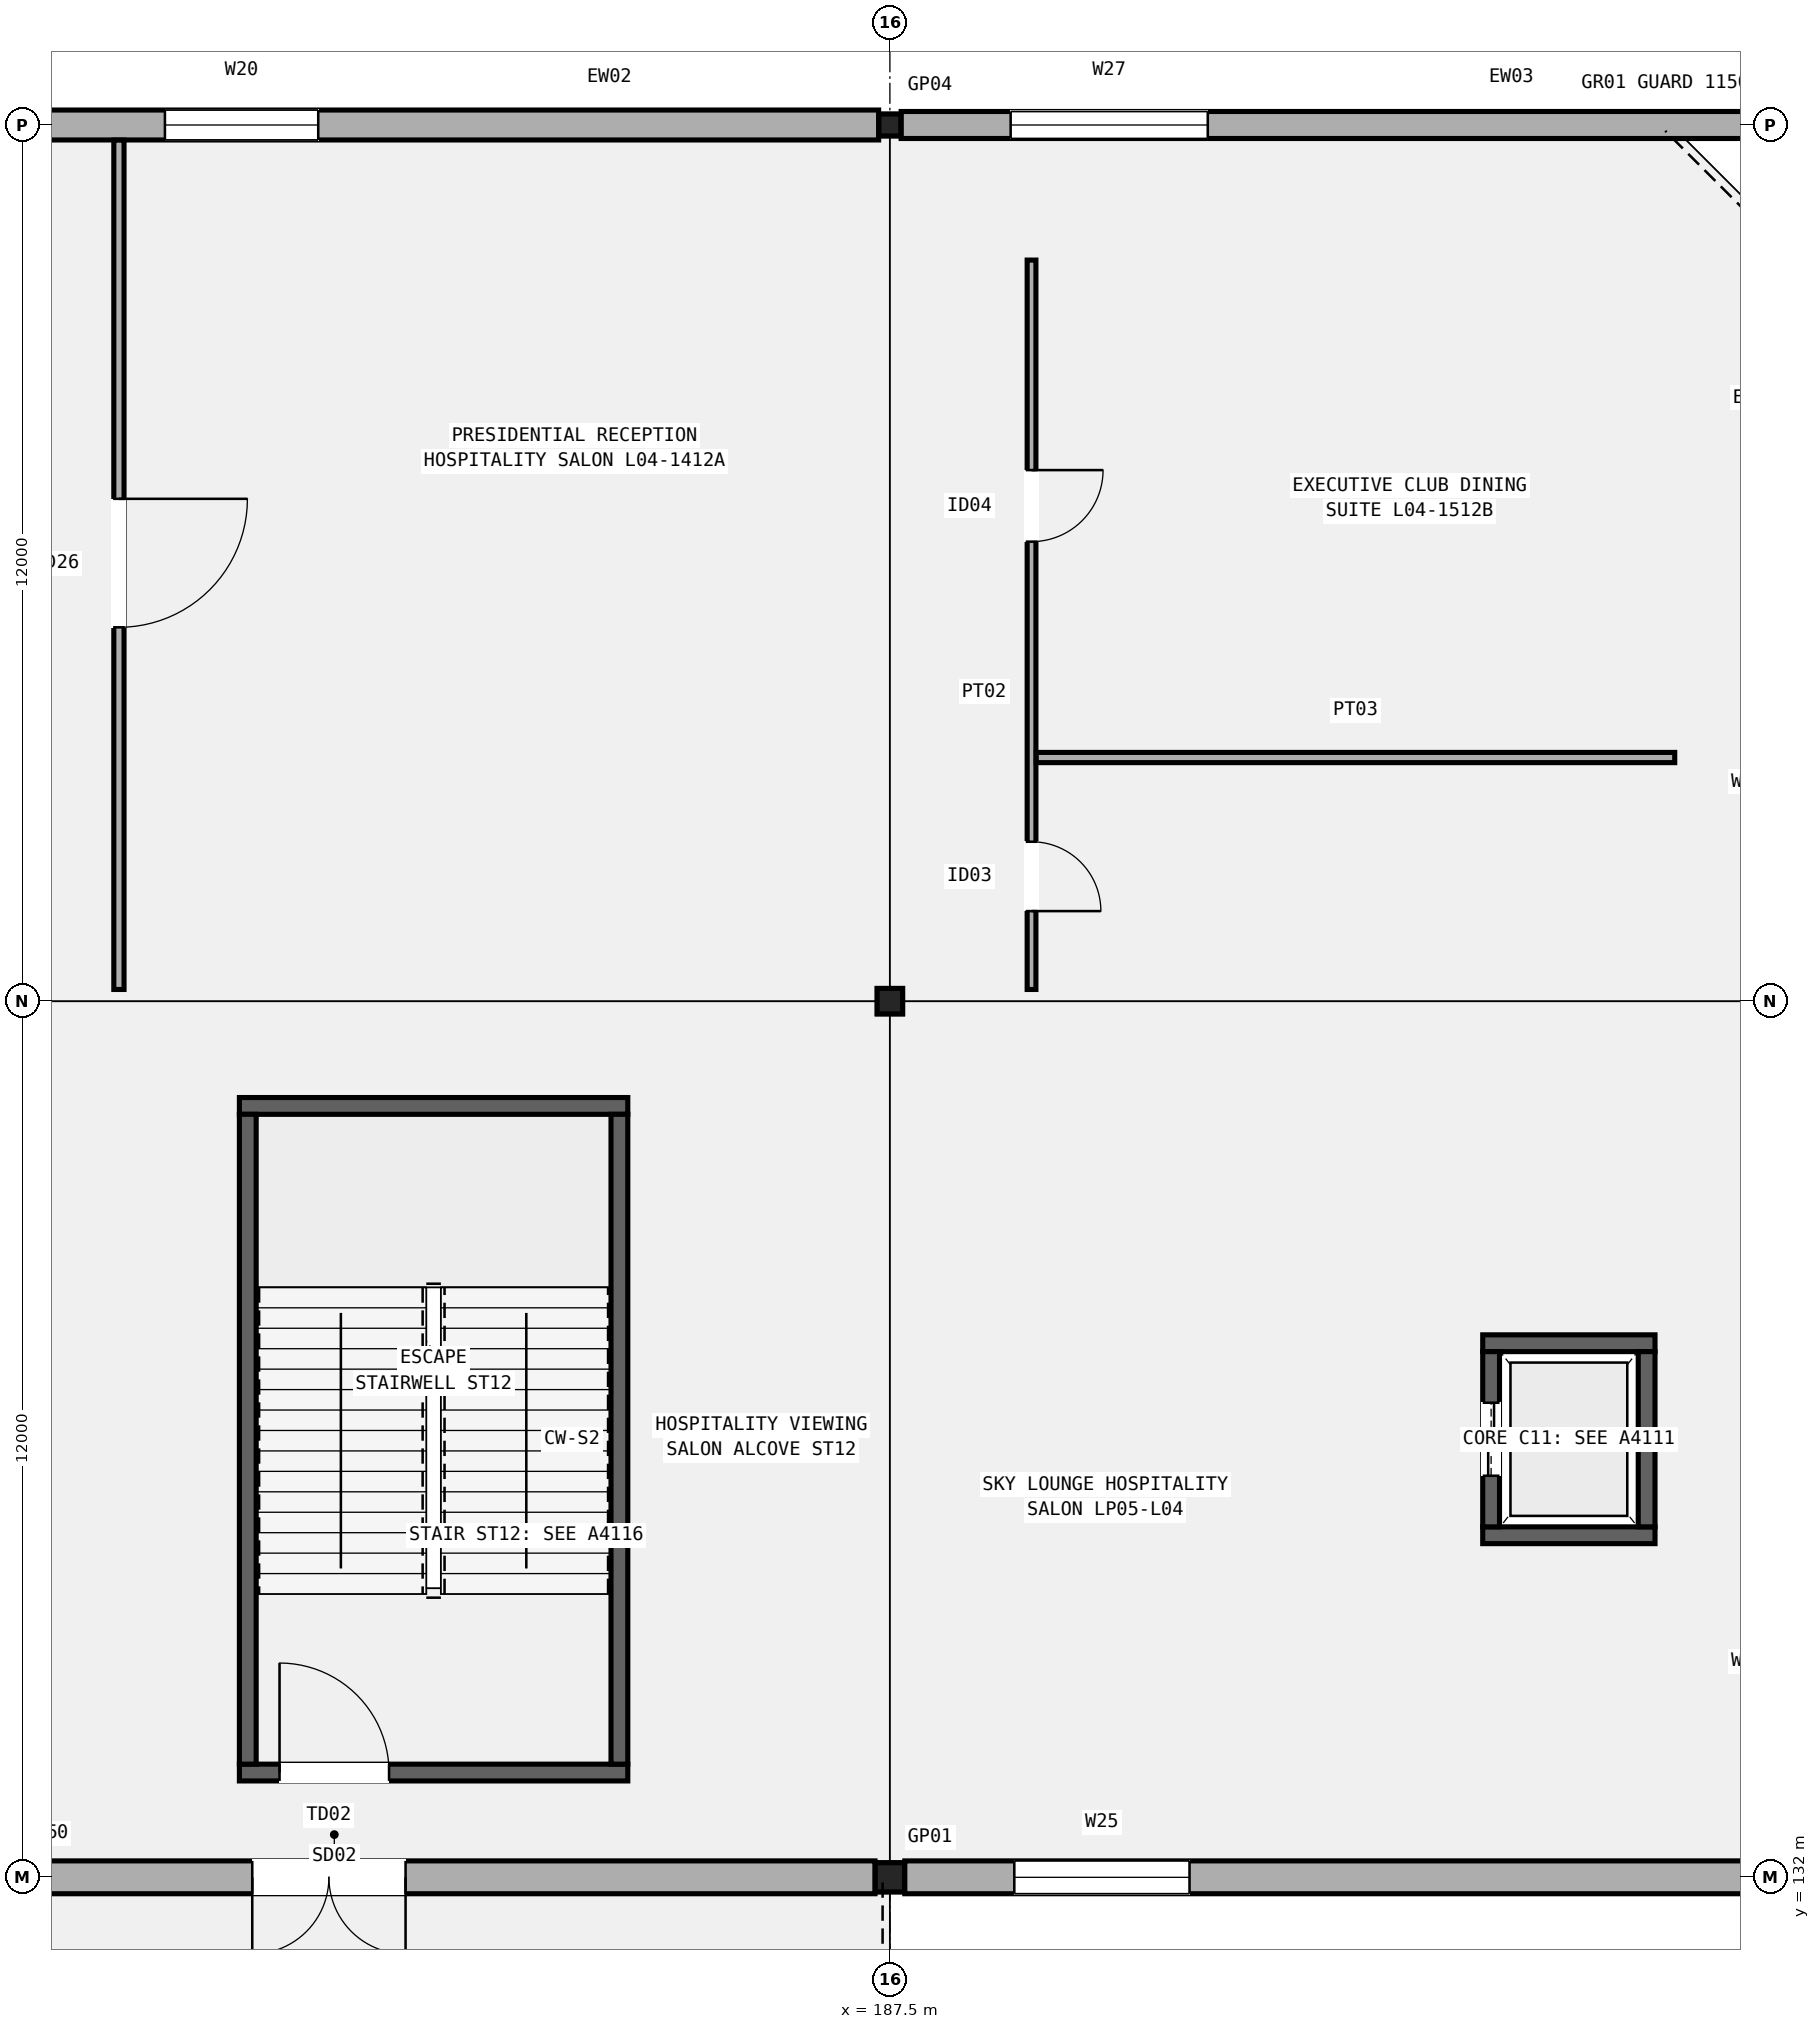
"""IFC4 building model, lengths in metres.
Left out: names, types, materials, properties, quantities, classifications, styles, units other than length and angle.
Written with IfcOpenShell. Run it as: python <this file> out.ifc"""

import sys

from ifc_helpers import new_model, si_unit, direction, frame, frame_2d, origin, origin_2d, place, context, subcontext, project, spatial, rectangle, hollow_rectangle, extrude, element, fill, save


model = new_model("IFC4")
c1 = context("Model", 3, precision=1e-05, world=origin(), true_north=direction((0.0, 1.0)))
c2 = subcontext(c1, "Body", "Model", "MODEL_VIEW")
j1 = project(units=[si_unit("LENGTHUNIT", "METRE"), si_unit("PLANEANGLEUNIT", "RADIAN")], contexts=[c1])
p1 = place(None, origin())
s1 = spatial("IfcSite", under=j1, at=p1, CompositionType="ELEMENT")
p2 = place(p1, origin())
s2 = spatial("IfcBuilding", under=s1, at=p2, CompositionType="ELEMENT")
p3 = place(p2, frame((0.0, 0.0, 20.4)))
s3 = spatial("IfcBuildingStorey", under=s2, at=p3, CompositionType="ELEMENT", Elevation=20.4)
p4 = place(p3, frame((187.5, 132.0, 0.0), z_axis=(0.0, 0.0, 1.0), x_axis=(1.0, 0.0, 0.0)))
e1 = element("IfcColumn", 1, at=p4, inside=s3, PredefinedType="COLUMN", context=c2, shape_type="SweptSolid", body=[
    extrude(hollow_rectangle(XDim=0.4, YDim=0.4, WallThickness=0.016, InnerFilletRadius=0.016, OuterFilletRadius=0.032, at=origin_2d()), origin(), (0.0, 0.0, 1.0), 5.4),
])
p5 = place(p3, frame((187.5, 144.0, 0.0), z_axis=(0.0, 0.0, 1.0), x_axis=(1.0, 0.0, 0.0)))
e2 = element("IfcColumn", 2, at=p5, inside=s3, PredefinedType="COLUMN", context=c2, shape_type="SweptSolid", body=[
    extrude(hollow_rectangle(XDim=0.35, YDim=0.35, WallThickness=0.016, InnerFilletRadius=0.016, OuterFilletRadius=0.032, at=origin_2d()), origin(), (0.0, 0.0, 1.0), 5.4),
])
p6 = place(p3, frame((187.5, 156.0, 0.0), z_axis=(0.0, 0.0, 1.0), x_axis=(1.0, 0.0, 0.0)))
e3 = element("IfcColumn", 3, at=p6, inside=s3, PredefinedType="COLUMN", context=c2, shape_type="SweptSolid", body=[
    extrude(hollow_rectangle(XDim=0.3, YDim=0.3, WallThickness=0.012, InnerFilletRadius=0.012, OuterFilletRadius=0.024, at=origin_2d()), origin(), (0.0, 0.0, 1.0), 5.4),
])
p7 = place(p3, frame((175.304, 132.0, 0.0), z_axis=(0.0, 0.0, 1.0), x_axis=(1.0, 0.0, 0.0)))
e4 = element("IfcWall", 4, at=p7, inside=s3, PredefinedType="SOLIDWALL", context=c2, shape_type="SweptSolid", body=[
    extrude(rectangle(XDim=11.992, YDim=0.45, at=frame_2d((5.996, 0.0))), origin(), (0.0, 0.0, 1.0), 4.58),
])
p8 = place(p7, frame((5.562, 0.0, 0.0), z_axis=(0.0, 0.0, 1.0), x_axis=(-1.0, 0.0, 0.0)))
e5 = element("IfcOpeningElement", 5, at=p8, cuts=e4, PredefinedType="OPENING", context=c2, shape_type="SweptSolid", body=[
    extrude(rectangle(XDim=2.1, YDim=2.35, at=frame_2d((1.05, 1.175))), frame((0.0, 0.235, 0.0), z_axis=(0.0, -1.0, 0.0), x_axis=(1.0, 0.0, 0.0)), (0.0, 0.0, 1.0), 0.47),
])
p9 = place(p3, frame((175.179, 156.0, 0.0), z_axis=(0.0, 0.0, 1.0), x_axis=(1.0, 0.0, 0.0)))
e6 = element("IfcWall", 6, at=p9, inside=s3, PredefinedType="SOLIDWALL", context=c2, shape_type="SweptSolid", body=[
    extrude(rectangle(XDim=12.167, YDim=0.41, at=frame_2d((6.083, 0.0))), origin(), (0.0, 0.0, 1.0), 4.48),
])
p10 = place(p9, frame((2.391, 0.0, 0.95)))
e7 = element("IfcOpeningElement", 7, at=p10, cuts=e6, PredefinedType="OPENING", context=c2, shape_type="SweptSolid", body=[
    extrude(rectangle(XDim=2.1, YDim=2.6, at=frame_2d((1.05, 1.3))), frame((0.0, 0.215, 0.0), z_axis=(0.0, -1.0, 0.0), x_axis=(1.0, 0.0, 0.0)), (0.0, 0.0, 1.0), 0.43),
])
p11 = place(p3, frame((187.704, 132.0, 0.0), z_axis=(0.0, 0.0, 1.0), x_axis=(1.0, 0.0, 0.0)))
e8 = element("IfcWall", 8, at=p11, inside=s3, PredefinedType="SOLIDWALL", context=c2, shape_type="SweptSolid", body=[
    extrude(rectangle(XDim=12.117, YDim=0.45, at=frame_2d((6.059, 0.0))), origin(), (0.0, 0.0, 1.0), 4.592),
])
p12 = place(p11, frame((1.5, 0.0, 0.95)))
e9 = element("IfcOpeningElement", 9, at=p12, cuts=e8, PredefinedType="OPENING", context=c2, shape_type="SweptSolid", body=[
    extrude(rectangle(XDim=2.4, YDim=2.45, at=frame_2d((1.2, 1.225))), frame((0.0, 0.235, 0.0), z_axis=(0.0, -1.0, 0.0), x_axis=(1.0, 0.0, 0.0)), (0.0, 0.0, 1.0), 0.47),
])
p13 = place(p3, frame((187.654, 156.0, 0.0), z_axis=(0.0, 0.0, 1.0), x_axis=(1.0, 0.0, 0.0)))
e10 = element("IfcWall", 10, at=p13, inside=s3, PredefinedType="SOLIDWALL", context=c2, shape_type="SweptSolid", body=[
    extrude(rectangle(XDim=12.217, YDim=0.37, at=frame_2d((6.108, 0.0))), origin(), (0.0, 0.0, 1.0), 4.58),
])
p14 = place(p13, frame((1.5, 0.0, 0.95)))
e11 = element("IfcOpeningElement", 11, at=p14, cuts=e10, PredefinedType="OPENING", context=c2, shape_type="SweptSolid", body=[
    extrude(rectangle(XDim=2.7, YDim=1.75, at=frame_2d((1.35, 0.875))), frame((0.0, 0.195, 0.0), z_axis=(0.0, -1.0, 0.0), x_axis=(1.0, 0.0, 0.0)), (0.0, 0.0, 1.0), 0.39),
])
p15 = place(p3, frame((178.59, 133.435, 0.0), z_axis=(0.0, 0.0, 1.0), x_axis=(1.0, 0.0, 0.0)))
e12 = element("IfcWall", 12, at=p15, inside=s3, PredefinedType="SHEAR", context=c2, shape_type="SweptSolid", body=[
    extrude(rectangle(XDim=5.32, YDim=0.23, at=frame_2d((2.66, 0.0))), origin(), (0.0, 0.0, 1.0), 5.18),
])
p16 = place(p15, frame((0.55, 0.0, 0.0)))
e13 = element("IfcOpeningElement", 13, at=p16, cuts=e12, PredefinedType="OPENING", context=c2, shape_type="SweptSolid", body=[
    extrude(rectangle(XDim=1.5, YDim=2.2, at=frame_2d((0.75, 1.1))), frame((0.0, 0.125, 0.0), z_axis=(0.0, -1.0, 0.0), x_axis=(1.0, 0.0, 0.0)), (0.0, 0.0, 1.0), 0.25),
])
p17 = place(p3, frame((178.59, 142.565, 0.0), z_axis=(0.0, 0.0, 1.0), x_axis=(1.0, 0.0, 0.0)))
e14 = element("IfcWall", 14, at=p17, inside=s3, PredefinedType="SHEAR", context=c2, shape_type="SweptSolid", body=[
    extrude(rectangle(XDim=5.32, YDim=0.23, at=frame_2d((2.66, 0.0))), origin(), (0.0, 0.0, 1.0), 5.18),
])
for number, where, z_axis, x_axis in (
    (15, (178.705, 133.55, 0.0), (0.0, 0.0, 1.0), (0.0, 1.0, 0.0)),
    (16, (183.795, 133.55, 0.0), (0.0, 0.0, 1.0), (0.0, 1.0, 0.0)),
):
    element("IfcWall", number, at=place(p3, frame(where, z_axis=z_axis, x_axis=x_axis)), inside=s3, PredefinedType="SHEAR", context=c2, shape_type="SweptSolid", body=[
        extrude(rectangle(XDim=8.9, YDim=0.23, at=frame_2d((4.45, 0.0))), origin(), (0.0, 0.0, 1.0), 5.18),
    ])
for number, where, z_axis, x_axis in (
    (17, (195.62, 136.685, 0.0), (0.0, 0.0, 1.0), (1.0, 0.0, 0.0)),
    (18, (195.62, 139.315, 0.0), (0.0, 0.0, 1.0), (1.0, 0.0, 0.0)),
):
    element("IfcWall", number, at=place(p3, frame(where, z_axis=z_axis, x_axis=x_axis)), inside=s3, PredefinedType="SHEAR", context=c2, shape_type="SweptSolid", body=[
        extrude(rectangle(XDim=2.36, YDim=0.23, at=frame_2d((1.18, 0.0))), origin(), (0.0, 0.0, 1.0), 5.18),
    ])
p18 = place(p3, frame((195.735, 136.8, 0.0), z_axis=(0.0, 0.0, 1.0), x_axis=(0.0, 1.0, 0.0)))
e19 = element("IfcWall", 19, at=p18, inside=s3, PredefinedType="SHEAR", context=c2, shape_type="SweptSolid", body=[
    extrude(rectangle(XDim=2.4, YDim=0.23, at=frame_2d((1.2, 0.0))), origin(), (0.0, 0.0, 1.0), 5.18),
])
p19 = place(p18, frame((0.7, 0.0, 0.0)))
e20 = element("IfcOpeningElement", 20, at=p19, cuts=e19, PredefinedType="OPENING", context=c2, shape_type="SweptSolid", body=[
    extrude(rectangle(XDim=1.0, YDim=2.15, at=frame_2d((0.5, 1.075))), frame((0.0, 0.125, 0.0), z_axis=(0.0, -1.0, 0.0), x_axis=(1.0, 0.0, 0.0)), (0.0, 0.0, 1.0), 0.25),
])
p20 = place(p3, frame((197.865, 136.8, 0.0), z_axis=(0.0, 0.0, 1.0), x_axis=(0.0, 1.0, 0.0)))
e21 = element("IfcWall", 21, at=p20, inside=s3, PredefinedType="SHEAR", context=c2, shape_type="SweptSolid", body=[
    extrude(rectangle(XDim=2.4, YDim=0.23, at=frame_2d((1.2, 0.0))), origin(), (0.0, 0.0, 1.0), 5.18),
])
p21 = place(p3, frame((176.94, 144.16, 0.0), z_axis=(0.0, 0.0, 1.0), x_axis=(0.0, 1.0, 0.0)))
e22 = element("IfcWall", 22, at=p21, inside=s3, PredefinedType="PARTITIONING", context=c2, shape_type="SweptSolid", body=[
    extrude(rectangle(XDim=11.633, YDim=0.14, at=frame_2d((5.816, 0.0))), origin(), (0.0, 0.0, 1.0), 4.52),
])
p22 = place(p21, frame((6.72, 0.0, 0.0), z_axis=(0.0, 0.0, 1.0), x_axis=(-1.0, 0.0, 0.0)))
e23 = element("IfcOpeningElement", 23, at=p22, cuts=e22, PredefinedType="OPENING", context=c2, shape_type="SweptSolid", body=[
    extrude(rectangle(XDim=1.76, YDim=2.3, at=frame_2d((0.88, 1.15))), frame((0.0, 0.08, 0.0), z_axis=(0.0, -1.0, 0.0), x_axis=(1.0, 0.0, 0.0)), (0.0, 0.0, 1.0), 0.16),
])
p23 = place(p3, frame((189.44, 144.16, 0.0), z_axis=(0.0, 0.0, 1.0), x_axis=(0.0, 1.0, 0.0)))
e24 = element("IfcWall", 24, at=p23, inside=s3, PredefinedType="PARTITIONING", context=c2, shape_type="SweptSolid", body=[
    extrude(rectangle(XDim=9.99, YDim=0.12, at=frame_2d((4.995, 0.0))), origin(), (0.0, 0.0, 1.0), 4.52),
])
p24 = place(p23, frame((2.023, 0.0, 0.0), z_axis=(0.0, 0.0, 1.0), x_axis=(-1.0, 0.0, 0.0)))
e25 = element("IfcOpeningElement", 25, at=p24, cuts=e24, PredefinedType="OPENING", context=c2, shape_type="SweptSolid", body=[
    extrude(rectangle(XDim=0.95, YDim=2.12, at=frame_2d((0.475, 1.06))), frame((0.0, 0.07, 0.0), z_axis=(0.0, -1.0, 0.0), x_axis=(1.0, 0.0, 0.0)), (0.0, 0.0, 1.0), 0.14),
])
p25 = place(p23, frame((7.113, 0.0, 0.0), z_axis=(0.0, 0.0, 1.0), x_axis=(-1.0, 0.0, 0.0)))
e26 = element("IfcOpeningElement", 26, at=p25, cuts=e24, PredefinedType="OPENING", context=c2, shape_type="SweptSolid", body=[
    extrude(rectangle(XDim=0.98, YDim=2.1, at=frame_2d((0.49, 1.05))), frame((0.0, 0.07, 0.0), z_axis=(0.0, -1.0, 0.0), x_axis=(1.0, 0.0, 0.0)), (0.0, 0.0, 1.0), 0.14),
])
p26 = place(p3, frame((189.505, 147.337, 0.0), z_axis=(0.0, 0.0, 1.0), x_axis=(1.0, 0.0, 0.0)))
e27 = element("IfcWall", 27, at=p26, inside=s3, PredefinedType="PARTITIONING", context=c2, shape_type="SweptSolid", body=[
    extrude(rectangle(XDim=8.745, YDim=0.14, at=frame_2d((4.373, 0.0))), origin(), (0.0, 0.0, 1.0), 4.52),
])
p27 = place(p8, origin())
e28 = element("IfcDoor", 28, at=p27, inside=s3, OperationType="DOUBLE_DOOR_SINGLE_SWING", PredefinedType="DOOR", context=c2, shape_type="SweptSolid", body=[
    extrude(rectangle(XDim=2.1, YDim=2.35, at=frame_2d((1.05, 1.175))), frame((0.0, 0.025, 0.0), z_axis=(0.0, -1.0, 0.0), x_axis=(1.0, 0.0, 0.0)), (0.0, 0.0, 1.0), 0.05),
])
fill(e5, e28)
p28 = place(p10, origin())
e29 = element("IfcWindow", 29, at=p28, inside=s3, PartitioningType="SINGLE_PANEL", PredefinedType="WINDOW", context=c2, shape_type="SweptSolid", body=[
    extrude(rectangle(XDim=2.1, YDim=2.6, at=frame_2d((1.05, 1.3))), frame((0.0, 0.03, 0.0), z_axis=(0.0, -1.0, 0.0), x_axis=(1.0, 0.0, 0.0)), (0.0, 0.0, 1.0), 0.06),
])
fill(e7, e29)
p29 = place(p12, origin())
e30 = element("IfcWindow", 30, at=p29, inside=s3, PartitioningType="SINGLE_PANEL", PredefinedType="WINDOW", context=c2, shape_type="SweptSolid", body=[
    extrude(rectangle(XDim=2.4, YDim=2.45, at=frame_2d((1.2, 1.225))), frame((0.0, 0.03, 0.0), z_axis=(0.0, -1.0, 0.0), x_axis=(1.0, 0.0, 0.0)), (0.0, 0.0, 1.0), 0.06),
])
fill(e9, e30)
p30 = place(p14, origin())
e31 = element("IfcWindow", 31, at=p30, inside=s3, PartitioningType="SINGLE_PANEL", PredefinedType="WINDOW", context=c2, shape_type="SweptSolid", body=[
    extrude(rectangle(XDim=2.7, YDim=1.75, at=frame_2d((1.35, 0.875))), frame((0.0, 0.03, 0.0), z_axis=(0.0, -1.0, 0.0), x_axis=(1.0, 0.0, 0.0)), (0.0, 0.0, 1.0), 0.06),
])
fill(e11, e31)
p31 = place(p16, origin())
e32 = element("IfcDoor", 32, at=p31, inside=s3, OperationType="SINGLE_SWING_LEFT", PredefinedType="DOOR", context=c2, shape_type="SweptSolid", body=[
    extrude(rectangle(XDim=1.5, YDim=2.2, at=frame_2d((0.75, 1.1))), frame((0.0, 0.025, 0.0), z_axis=(0.0, -1.0, 0.0), x_axis=(1.0, 0.0, 0.0)), (0.0, 0.0, 1.0), 0.05),
])
fill(e13, e32)
p32 = place(p19, origin())
e33 = element("IfcDoor", 33, at=p32, inside=s3, OperationType="DOUBLE_DOOR_SLIDING", PredefinedType="DOOR", context=c2, shape_type="SweptSolid", body=[
    extrude(rectangle(XDim=1.0, YDim=2.15, at=frame_2d((0.5, 1.075))), frame((0.0, 0.025, 0.0), z_axis=(0.0, -1.0, 0.0), x_axis=(1.0, 0.0, 0.0)), (0.0, 0.0, 1.0), 0.05),
])
fill(e20, e33)
p33 = place(p22, origin())
e34 = element("IfcDoor", 34, at=p33, inside=s3, OperationType="SINGLE_SWING_LEFT", PredefinedType="DOOR", context=c2, shape_type="SweptSolid", body=[
    extrude(rectangle(XDim=1.76, YDim=2.3, at=frame_2d((0.88, 1.15))), frame((0.0, 0.025, 0.0), z_axis=(0.0, -1.0, 0.0), x_axis=(1.0, 0.0, 0.0)), (0.0, 0.0, 1.0), 0.05),
])
fill(e23, e34)
p34 = place(p24, origin())
e35 = element("IfcDoor", 35, at=p34, inside=s3, OperationType="SINGLE_SWING_RIGHT", PredefinedType="DOOR", context=c2, shape_type="SweptSolid", body=[
    extrude(rectangle(XDim=0.95, YDim=2.12, at=frame_2d((0.475, 1.06))), frame((0.0, 0.025, 0.0), z_axis=(0.0, -1.0, 0.0), x_axis=(1.0, 0.0, 0.0)), (0.0, 0.0, 1.0), 0.05),
])
fill(e25, e35)
p35 = place(p25, origin())
e36 = element("IfcDoor", 36, at=p35, inside=s3, OperationType="SINGLE_SWING_LEFT", PredefinedType="DOOR", context=c2, shape_type="SweptSolid", body=[
    extrude(rectangle(XDim=0.98, YDim=2.1, at=frame_2d((0.49, 1.05))), frame((0.0, 0.025, 0.0), z_axis=(0.0, -1.0, 0.0), x_axis=(1.0, 0.0, 0.0)), (0.0, 0.0, 1.0), 0.05),
])
fill(e26, e36)
save(model, sys.argv[1])
